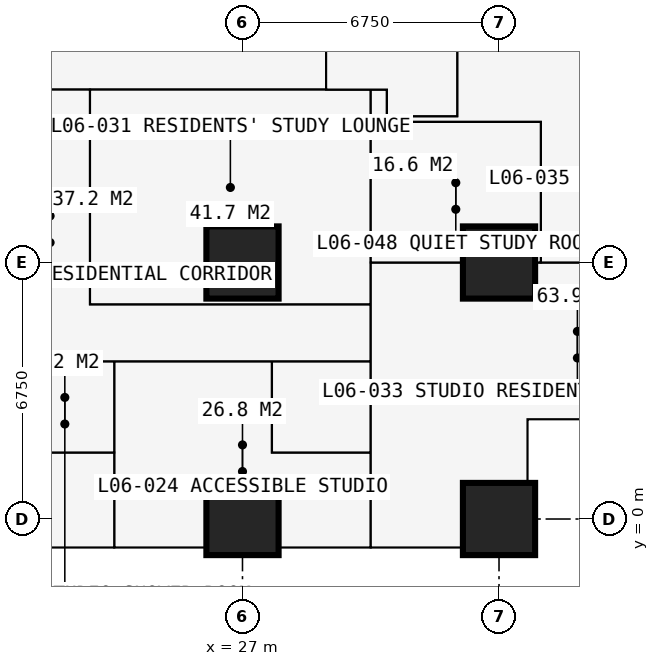
"""IFC4 building model, lengths in metres.
Left out: names, types, materials, properties, quantities, classifications, styles, units other than length and angle.
Written with IfcOpenShell. Run it as: python <this file> out.ifc"""

import sys

from ifc_helpers import new_model, si_unit, direction, frame, frame_2d, origin, origin_2d, place, context, subcontext, project, spatial, rectangle, extrude, element, fill, save


model = new_model("IFC4")
c1 = context("Model", 3, precision=1e-05, world=origin(), true_north=direction((0.0, 1.0)))
c2 = subcontext(c1, "Body", "Model", "MODEL_VIEW")
j1 = project(units=[si_unit("LENGTHUNIT", "METRE"), si_unit("PLANEANGLEUNIT", "RADIAN")], contexts=[c1])
p1 = place(None, origin())
s1 = spatial("IfcSite", under=j1, at=p1, CompositionType="ELEMENT")
p2 = place(p1, origin())
s2 = spatial("IfcBuilding", under=s1, at=p2, CompositionType="ELEMENT")
p3 = place(p2, frame((0.0, 0.0, 25.2)))
s3 = spatial("IfcBuildingStorey", under=s2, at=p3, CompositionType="ELEMENT", Elevation=25.2)
for number, where, z_axis, x_axis in (
    (1, (27.0, 0.0, 0.0), (0.0, 0.0, 1.0), (1.0, 0.0, 0.0)),
    (2, (27.0, 6.75, 0.0), (0.0, 0.0, 1.0), (1.0, 0.0, 0.0)),
    (3, (33.75, 0.0, 0.0), (0.0, 0.0, 1.0), (1.0, 0.0, 0.0)),
    (4, (33.75, 6.75, 0.0), (0.0, 0.0, 1.0), (1.0, 0.0, 0.0)),
):
    element("IfcColumn", number, at=place(p3, frame(where, z_axis=z_axis, x_axis=x_axis)), inside=s3, PredefinedType="COLUMN", context=c2, shape_type="SweptSolid", body=[
        extrude(rectangle(XDim=1.9, YDim=1.9, at=origin_2d()), origin(), (0.0, 0.0, 1.0), 3.6),
    ])
p4 = place(p3, frame((34.5, -0.75, 0.0), z_axis=(0.0, 0.0, 1.0), x_axis=(0.0, 1.0, 0.0)))
e5 = element("IfcWall", 5, at=p4, inside=s3, PredefinedType="SOLIDWALL", context=c2, shape_type="SweptSolid", body=[
    extrude(rectangle(XDim=3.375, YDim=0.3, at=frame_2d((1.688, 0.0))), origin(), (0.0, 0.0, 1.0), 3.375),
])
p5 = place(p4, frame((1.857, 0.0, 0.9)))
e6 = element("IfcOpeningElement", 6, at=p5, cuts=e5, PredefinedType="OPENING", context=c2, shape_type="SweptSolid", body=[
    extrude(rectangle(XDim=1.2, YDim=1.8, at=frame_2d((0.6, 0.9))), frame((0.0, 0.16, 0.0), z_axis=(0.0, -1.0, 0.0), x_axis=(1.0, 0.0, 0.0)), (0.0, 0.0, 1.0), 0.32),
])
p6 = place(p3, frame((34.5, 2.625, 0.0), z_axis=(0.0, 0.0, 1.0), x_axis=(1.0, 0.0, 0.0)))
e7 = element("IfcWall", 7, at=p6, inside=s3, PredefinedType="SOLIDWALL", context=c2, shape_type="SweptSolid", body=[
    extrude(rectangle(XDim=3.375, YDim=0.3, at=frame_2d((1.688, 0.0))), origin(), (0.0, 0.0, 1.0), 3.375),
])
p7 = place(p6, frame((0.788, 0.0, 0.6)))
e8 = element("IfcOpeningElement", 8, at=p7, cuts=e7, PredefinedType="OPENING", context=c2, shape_type="SweptSolid", body=[
    extrude(rectangle(XDim=1.8, YDim=2.1, at=frame_2d((0.9, 1.05))), frame((0.0, 0.16, 0.0), z_axis=(0.0, -1.0, 0.0), x_axis=(1.0, 0.0, 0.0)), (0.0, 0.0, 1.0), 0.32),
])
p8 = place(p3, frame((6.75, 4.15, 0.0), z_axis=(0.0, 0.0, 1.0), x_axis=(1.0, 0.0, 0.0)))
e9 = element("IfcWall", 9, at=p8, inside=s3, PredefinedType="PARTITIONING", context=c2, shape_type="SweptSolid", body=[
    extrude(rectangle(XDim=23.625, YDim=0.15, at=frame_2d((11.812, 0.0))), origin(), (0.0, 0.0, 1.0), 3.375),
])
p9 = place(p8, frame((0.2, 0.0, 0.0)))
e10 = element("IfcOpeningElement", 10, at=p9, cuts=e9, PredefinedType="OPENING", context=c2, shape_type="SweptSolid", body=[
    extrude(rectangle(XDim=0.95, YDim=2.2, at=frame_2d((0.475, 1.1))), frame((0.0, 0.085, 0.0), z_axis=(0.0, -1.0, 0.0), x_axis=(1.0, 0.0, 0.0)), (0.0, 0.0, 1.0), 0.17),
])
p10 = place(p8, frame((3.625, 0.0, 0.0)))
e11 = element("IfcOpeningElement", 11, at=p10, cuts=e9, PredefinedType="OPENING", context=c2, shape_type="SweptSolid", body=[
    extrude(rectangle(XDim=0.95, YDim=2.2, at=frame_2d((0.475, 1.1))), frame((0.0, 0.085, 0.0), z_axis=(0.0, -1.0, 0.0), x_axis=(1.0, 0.0, 0.0)), (0.0, 0.0, 1.0), 0.17),
])
p11 = place(p8, frame((18.475, 0.0, 0.0)))
e12 = element("IfcOpeningElement", 12, at=p11, cuts=e9, PredefinedType="OPENING", context=c2, shape_type="SweptSolid", body=[
    extrude(rectangle(XDim=0.95, YDim=2.2, at=frame_2d((0.475, 1.1))), frame((0.0, 0.085, 0.0), z_axis=(0.0, -1.0, 0.0), x_axis=(1.0, 0.0, 0.0)), (0.0, 0.0, 1.0), 0.17),
])
p12 = place(p8, frame((11.725, 0.0, 0.0)))
e13 = element("IfcOpeningElement", 13, at=p12, cuts=e9, PredefinedType="OPENING", context=c2, shape_type="SweptSolid", body=[
    extrude(rectangle(XDim=0.95, YDim=2.2, at=frame_2d((0.475, 1.1))), frame((0.0, 0.085, 0.0), z_axis=(0.0, -1.0, 0.0), x_axis=(1.0, 0.0, 0.0)), (0.0, 0.0, 1.0), 0.17),
])
p13 = place(p8, frame((6.95, 0.0, 0.0)))
e14 = element("IfcOpeningElement", 14, at=p13, cuts=e9, PredefinedType="OPENING", context=c2, shape_type="SweptSolid", body=[
    extrude(rectangle(XDim=0.95, YDim=2.2, at=frame_2d((0.475, 1.1))), frame((0.0, 0.085, 0.0), z_axis=(0.0, -1.0, 0.0), x_axis=(1.0, 0.0, 0.0)), (0.0, 0.0, 1.0), 0.17),
])
p14 = place(p3, frame((10.125, 11.3, 0.0), z_axis=(0.0, 0.0, 1.0), x_axis=(1.0, 0.0, 0.0)))
e15 = element("IfcWall", 15, at=p14, inside=s3, PredefinedType="PARTITIONING", context=c2, shape_type="SweptSolid", body=[
    extrude(rectangle(XDim=20.675, YDim=0.15, at=frame_2d((10.337, 0.0))), origin(), (0.0, 0.0, 1.0), 3.375),
])
p15 = place(p14, frame((1.775, 0.0, 0.0)))
e16 = element("IfcOpeningElement", 16, at=p15, cuts=e15, PredefinedType="OPENING", context=c2, shape_type="SweptSolid", body=[
    extrude(rectangle(XDim=1.0, YDim=2.2, at=frame_2d((0.5, 1.1))), frame((0.0, 0.085, 0.0), z_axis=(0.0, -1.0, 0.0), x_axis=(1.0, 0.0, 0.0)), (0.0, 0.0, 1.0), 0.17),
])
p16 = place(p14, frame((11.312, 0.0, 0.0)))
e17 = element("IfcOpeningElement", 17, at=p16, cuts=e15, PredefinedType="OPENING", context=c2, shape_type="SweptSolid", body=[
    extrude(rectangle(XDim=1.0, YDim=2.2, at=frame_2d((0.5, 1.1))), frame((0.0, 0.085, 0.0), z_axis=(0.0, -1.0, 0.0), x_axis=(1.0, 0.0, 0.0)), (0.0, 0.0, 1.0), 0.17),
])
p17 = place(p3, frame((21.025, 1.75, 0.0), z_axis=(0.0, 0.0, 1.0), x_axis=(1.0, 0.0, 0.0)))
e18 = element("IfcWall", 18, at=p17, inside=s3, PredefinedType="PARTITIONING", context=c2, shape_type="SweptSolid", body=[
    extrude(rectangle(XDim=2.6, YDim=0.1, at=frame_2d((1.3, 0.0))), origin(), (0.0, 0.0, 1.0), 3.375),
])
p18 = place(p3, frame((22.988, 5.65, 0.0), z_axis=(0.0, 0.0, 1.0), x_axis=(1.0, 0.0, 0.0)))
e19 = element("IfcWall", 19, at=p18, inside=s3, PredefinedType="PARTITIONING", context=c2, shape_type="SweptSolid", body=[
    extrude(rectangle(XDim=7.387, YDim=0.15, at=frame_2d((3.694, 0.0))), origin(), (0.0, 0.0, 1.0), 3.375),
])
p19 = place(p18, frame((2.1, 0.0, 0.0)))
e20 = element("IfcOpeningElement", 20, at=p19, cuts=e19, PredefinedType="OPENING", context=c2, shape_type="SweptSolid", body=[
    extrude(rectangle(XDim=0.95, YDim=2.2, at=frame_2d((0.475, 1.1))), frame((0.0, 0.085, 0.0), z_axis=(0.0, -1.0, 0.0), x_axis=(1.0, 0.0, 0.0)), (0.0, 0.0, 1.0), 0.17),
])
p20 = place(p3, frame((22.988, 5.65, 0.0), z_axis=(0.0, 0.0, 1.0), x_axis=(0.0, 1.0, 0.0)))
e21 = element("IfcWall", 21, at=p20, inside=s3, PredefinedType="PARTITIONING", context=c2, shape_type="SweptSolid", body=[
    extrude(rectangle(XDim=5.65, YDim=0.15, at=frame_2d((2.825, 0.0))), origin(), (0.0, 0.0, 1.0), 3.375),
])
p21 = place(p3, frame((23.625, -0.734, 0.0), z_axis=(0.0, 0.0, 1.0), x_axis=(0.0, 1.0, 0.0)))
e22 = element("IfcWall", 22, at=p21, inside=s3, PredefinedType="PARTITIONING", context=c2, shape_type="SweptSolid", body=[
    extrude(rectangle(XDim=4.884, YDim=0.175, at=frame_2d((2.442, 0.0))), origin(), (0.0, 0.0, 1.0), 3.375),
])
p22 = place(p21, frame((3.234, 0.0, 0.0)))
e23 = element("IfcOpeningElement", 23, at=p22, cuts=e22, PredefinedType="OPENING", context=c2, shape_type="SweptSolid", body=[
    extrude(rectangle(XDim=0.9, YDim=2.2, at=frame_2d((0.45, 1.1))), frame((0.0, 0.097, 0.0), z_axis=(0.0, -1.0, 0.0), x_axis=(1.0, 0.0, 0.0)), (0.0, 0.0, 1.0), 0.195),
])
p23 = place(p3, frame((27.775, 1.75, 0.0), z_axis=(0.0, 0.0, 1.0), x_axis=(0.0, 1.0, 0.0)))
e24 = element("IfcWall", 24, at=p23, inside=s3, PredefinedType="PARTITIONING", context=c2, shape_type="SweptSolid", body=[
    extrude(rectangle(XDim=2.4, YDim=0.1, at=frame_2d((1.2, 0.0))), origin(), (0.0, 0.0, 1.0), 3.375),
])
p24 = place(p3, frame((27.775, 1.75, 0.0), z_axis=(0.0, 0.0, 1.0), x_axis=(1.0, 0.0, 0.0)))
e25 = element("IfcWall", 25, at=p24, inside=s3, PredefinedType="PARTITIONING", context=c2, shape_type="SweptSolid", body=[
    extrude(rectangle(XDim=2.6, YDim=0.1, at=frame_2d((1.3, 0.0))), origin(), (0.0, 0.0, 1.0), 3.375),
])
p25 = place(p24, frame((0.85, 0.0, 0.0)))
e26 = element("IfcOpeningElement", 26, at=p25, cuts=e25, PredefinedType="OPENING", context=c2, shape_type="SweptSolid", body=[
    extrude(rectangle(XDim=0.9, YDim=2.2, at=frame_2d((0.45, 1.1))), frame((0.0, 0.06, 0.0), z_axis=(0.0, -1.0, 0.0), x_axis=(1.0, 0.0, 0.0)), (0.0, 0.0, 1.0), 0.12),
])
p26 = place(p3, frame((29.2, 11.3, 0.0), z_axis=(0.0, 0.0, 1.0), x_axis=(0.0, 1.0, 0.0)))
e27 = element("IfcWall", 27, at=p26, inside=s3, PredefinedType="PARTITIONING", context=c2, shape_type="SweptSolid", body=[
    extrude(rectangle(XDim=17.9, YDim=0.2, at=frame_2d((8.95, 0.0))), origin(), (0.0, 0.0, 1.0), 3.375),
])
p27 = place(p26, frame((8.35, 0.0, 0.0)))
e28 = element("IfcOpeningElement", 28, at=p27, cuts=e27, PredefinedType="OPENING", context=c2, shape_type="SweptSolid", body=[
    extrude(rectangle(XDim=1.2, YDim=2.2, at=frame_2d((0.6, 1.1))), frame((0.0, 0.11, 0.0), z_axis=(0.0, -1.0, 0.0), x_axis=(1.0, 0.0, 0.0)), (0.0, 0.0, 1.0), 0.22),
])
p28 = place(p3, frame((30.375, -0.734, 0.0), z_axis=(0.0, 0.0, 1.0), x_axis=(0.0, 1.0, 0.0)))
e29 = element("IfcWall", 29, at=p28, inside=s3, PredefinedType="PARTITIONING", context=c2, shape_type="SweptSolid", body=[
    extrude(rectangle(XDim=12.034, YDim=0.15, at=frame_2d((6.017, 0.0))), origin(), (0.0, 0.0, 1.0), 3.375),
])
p29 = place(p28, frame((5.134, 0.0, 0.0)))
e30 = element("IfcOpeningElement", 30, at=p29, cuts=e29, PredefinedType="OPENING", context=c2, shape_type="SweptSolid", body=[
    extrude(rectangle(XDim=1.0, YDim=2.2, at=frame_2d((0.5, 1.1))), frame((0.0, 0.085, 0.0), z_axis=(0.0, -1.0, 0.0), x_axis=(1.0, 0.0, 0.0)), (0.0, 0.0, 1.0), 0.17),
])
p30 = place(p3, frame((30.375, 6.75, 0.0), z_axis=(0.0, 0.0, 1.0), x_axis=(1.0, 0.0, 0.0)))
e31 = element("IfcWall", 31, at=p30, inside=s3, PredefinedType="PARTITIONING", context=c2, shape_type="SweptSolid", body=[
    extrude(rectangle(XDim=5.975, YDim=0.15, at=frame_2d((2.988, 0.0))), origin(), (0.0, 0.0, 1.0), 2.877),
])
p31 = place(p3, frame((30.375, 10.45, 0.0), z_axis=(0.0, 0.0, 1.0), x_axis=(1.0, 0.0, 0.0)))
e32 = element("IfcWall", 32, at=p31, inside=s3, PredefinedType="PARTITIONING", context=c2, shape_type="SweptSolid", body=[
    extrude(rectangle(XDim=4.475, YDim=0.15, at=frame_2d((2.238, 0.0))), origin(), (0.0, 0.0, 1.0), 3.375),
])
p32 = place(p31, frame((2.35, 0.0, 0.0)))
e33 = element("IfcOpeningElement", 33, at=p32, cuts=e32, PredefinedType="OPENING", context=c2, shape_type="SweptSolid", body=[
    extrude(rectangle(XDim=0.95, YDim=2.2, at=frame_2d((0.475, 1.1))), frame((0.0, 0.085, 0.0), z_axis=(0.0, -1.0, 0.0), x_axis=(1.0, 0.0, 0.0)), (0.0, 0.0, 1.0), 0.17),
])
p33 = place(p3, frame((30.8, 10.6, 0.0), z_axis=(0.0, 0.0, 1.0), x_axis=(0.0, 1.0, 0.0)))
e34 = element("IfcWall", 34, at=p33, inside=s3, PredefinedType="PARTITIONING", context=c2, shape_type="SweptSolid", body=[
    extrude(rectangle(XDim=0.7, YDim=0.15, at=frame_2d((0.35, 0.0))), origin(), (0.0, 0.0, 1.0), 3.375),
])
p34 = place(p3, frame((30.8, 10.6, 0.0), z_axis=(0.0, 0.0, 1.0), x_axis=(1.0, 0.0, 0.0)))
e35 = element("IfcWall", 35, at=p34, inside=s3, PredefinedType="PARTITIONING", context=c2, shape_type="SweptSolid", body=[
    extrude(rectangle(XDim=1.85, YDim=0.15, at=frame_2d((0.925, 0.0))), origin(), (0.0, 0.0, 1.0), 3.375),
])
p35 = place(p3, frame((32.65, 10.6, 0.0), z_axis=(0.0, 0.0, 1.0), x_axis=(0.0, 1.0, 0.0)))
e36 = element("IfcWall", 36, at=p35, inside=s3, PredefinedType="SHEAR", context=c2, shape_type="SweptSolid", body=[
    extrude(rectangle(XDim=9.3, YDim=0.1, at=frame_2d((4.65, 0.0))), origin(), (0.0, 0.0, 1.0), 3.375),
])
p36 = place(p35, frame((0.5, 0.0, 0.0)))
e37 = element("IfcOpeningElement", 37, at=p36, cuts=e36, PredefinedType="OPENING", context=c2, shape_type="SweptSolid", body=[
    extrude(rectangle(XDim=1.0, YDim=2.2, at=frame_2d((0.5, 1.1))), frame((0.0, 0.06, 0.0), z_axis=(0.0, -1.0, 0.0), x_axis=(1.0, 0.0, 0.0)), (0.0, 0.0, 1.0), 0.12),
])
p37 = place(p3, frame((34.85, 6.75, 0.0), z_axis=(0.0, 0.0, 1.0), x_axis=(0.0, 1.0, 0.0)))
e38 = element("IfcWall", 38, at=p37, inside=s3, PredefinedType="PARTITIONING", context=c2, shape_type="SweptSolid", body=[
    extrude(rectangle(XDim=3.7, YDim=0.15, at=frame_2d((1.85, 0.0))), origin(), (0.0, 0.0, 1.0), 3.375),
])
p38 = place(p5, origin())
e39 = element("IfcWindow", 39, at=p38, inside=s3, PartitioningType="SINGLE_PANEL", PredefinedType="WINDOW", context=c2, shape_type="SweptSolid", body=[
    extrude(rectangle(XDim=1.2, YDim=1.8, at=frame_2d((0.6, 0.9))), frame((0.0, 0.03, 0.0), z_axis=(0.0, -1.0, 0.0), x_axis=(1.0, 0.0, 0.0)), (0.0, 0.0, 1.0), 0.06),
])
fill(e6, e39)
p39 = place(p7, origin())
e40 = element("IfcWindow", 40, at=p39, inside=s3, PartitioningType="SINGLE_PANEL", PredefinedType="WINDOW", context=c2, shape_type="SweptSolid", body=[
    extrude(rectangle(XDim=1.8, YDim=2.1, at=frame_2d((0.9, 1.05))), frame((0.0, 0.03, 0.0), z_axis=(0.0, -1.0, 0.0), x_axis=(1.0, 0.0, 0.0)), (0.0, 0.0, 1.0), 0.06),
])
fill(e8, e40)
p40 = place(p11, origin())
e41 = element("IfcDoor", 41, at=p40, inside=s3, OperationType="SINGLE_SWING_LEFT", PredefinedType="DOOR", context=c2, shape_type="SweptSolid", body=[
    extrude(rectangle(XDim=0.95, YDim=2.2, at=frame_2d((0.475, 1.1))), frame((0.0, 0.025, 0.0), z_axis=(0.0, -1.0, 0.0), x_axis=(1.0, 0.0, 0.0)), (0.0, 0.0, 1.0), 0.05),
])
fill(e12, e41)
p41 = place(p25, origin())
e42 = element("IfcDoor", 42, at=p41, inside=s3, OperationType="SINGLE_SWING_RIGHT", PredefinedType="DOOR", context=c2, shape_type="SweptSolid", body=[
    extrude(rectangle(XDim=0.9, YDim=2.2, at=frame_2d((0.45, 1.1))), frame((0.0, 0.025, 0.0), z_axis=(0.0, -1.0, 0.0), x_axis=(1.0, 0.0, 0.0)), (0.0, 0.0, 1.0), 0.05),
])
fill(e26, e42)
p42 = place(p22, origin())
e43 = element("IfcDoor", 43, at=p42, inside=s3, OperationType="SINGLE_SWING_RIGHT", PredefinedType="DOOR", context=c2, shape_type="SweptSolid", body=[
    extrude(rectangle(XDim=0.9, YDim=2.2, at=frame_2d((0.45, 1.1))), frame((0.0, 0.025, 0.0), z_axis=(0.0, -1.0, 0.0), x_axis=(1.0, 0.0, 0.0)), (0.0, 0.0, 1.0), 0.05),
])
fill(e23, e43)
p43 = place(p16, origin())
e44 = element("IfcDoor", 44, at=p43, inside=s3, OperationType="SINGLE_SWING_LEFT", PredefinedType="DOOR", context=c2, shape_type="SweptSolid", body=[
    extrude(rectangle(XDim=1.0, YDim=2.2, at=frame_2d((0.5, 1.1))), frame((0.0, 0.025, 0.0), z_axis=(0.0, -1.0, 0.0), x_axis=(1.0, 0.0, 0.0)), (0.0, 0.0, 1.0), 0.05),
])
fill(e17, e44)
p44 = place(p19, origin())
e45 = element("IfcDoor", 45, at=p44, inside=s3, OperationType="SINGLE_SWING_LEFT", PredefinedType="DOOR", context=c2, shape_type="SweptSolid", body=[
    extrude(rectangle(XDim=0.95, YDim=2.2, at=frame_2d((0.475, 1.1))), frame((0.0, 0.025, 0.0), z_axis=(0.0, -1.0, 0.0), x_axis=(1.0, 0.0, 0.0)), (0.0, 0.0, 1.0), 0.05),
])
fill(e20, e45)
p45 = place(p29, origin())
e46 = element("IfcDoor", 46, at=p45, inside=s3, OperationType="SINGLE_SWING_LEFT", PredefinedType="DOOR", context=c2, shape_type="SweptSolid", body=[
    extrude(rectangle(XDim=1.0, YDim=2.2, at=frame_2d((0.5, 1.1))), frame((0.0, 0.025, 0.0), z_axis=(0.0, -1.0, 0.0), x_axis=(1.0, 0.0, 0.0)), (0.0, 0.0, 1.0), 0.05),
])
fill(e30, e46)
p46 = place(p36, origin())
e47 = element("IfcDoor", 47, at=p46, inside=s3, OperationType="SINGLE_SWING_LEFT", PredefinedType="DOOR", context=c2, shape_type="SweptSolid", body=[
    extrude(rectangle(XDim=1.0, YDim=2.2, at=frame_2d((0.5, 1.1))), frame((0.0, 0.025, 0.0), z_axis=(0.0, -1.0, 0.0), x_axis=(1.0, 0.0, 0.0)), (0.0, 0.0, 1.0), 0.05),
])
fill(e37, e47)
p47 = place(p32, origin())
e48 = element("IfcDoor", 48, at=p47, inside=s3, OperationType="SINGLE_SWING_LEFT", PredefinedType="DOOR", context=c2, shape_type="SweptSolid", body=[
    extrude(rectangle(XDim=0.95, YDim=2.2, at=frame_2d((0.475, 1.1))), frame((0.0, 0.025, 0.0), z_axis=(0.0, -1.0, 0.0), x_axis=(1.0, 0.0, 0.0)), (0.0, 0.0, 1.0), 0.05),
])
fill(e33, e48)
save(model, sys.argv[1])
